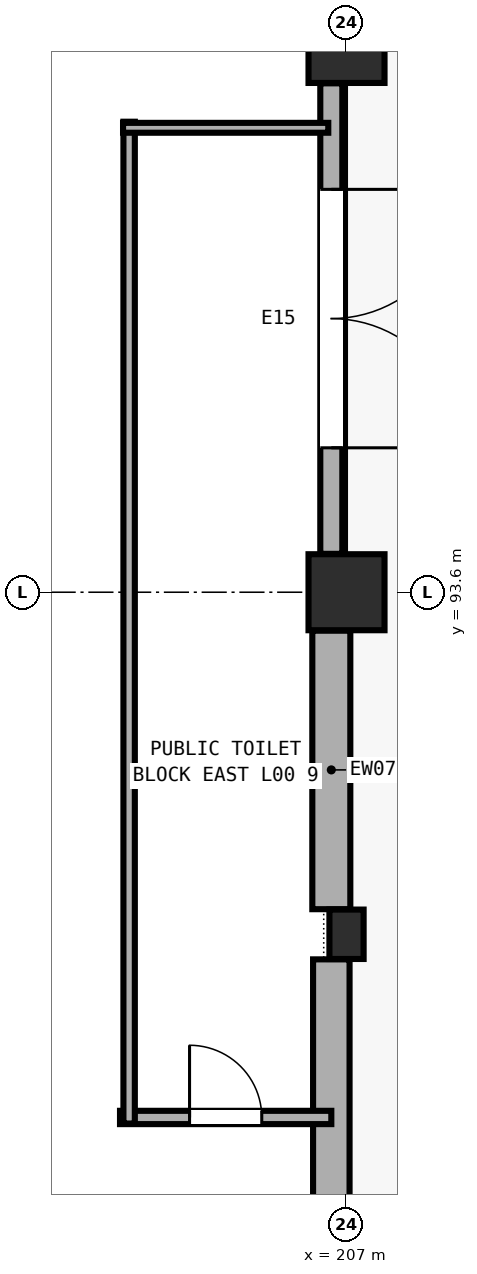
"""IFC4 building model, lengths in metres.
Left out: names, types, materials, properties, quantities, classifications, styles, units other than length and angle.
Written with IfcOpenShell. Run it as: python <this file> out.ifc"""

import sys

from ifc_helpers import new_model, si_unit, direction, frame, frame_2d, origin, origin_2d, place, context, subcontext, project, spatial, rectangle, extrude, element, fill, save


model = new_model("IFC4")
c1 = context("Model", 3, precision=1e-05, world=origin(), true_north=direction((0.0, 1.0)))
c2 = subcontext(c1, "Body", "Model", "MODEL_VIEW")
j1 = project(units=[si_unit("LENGTHUNIT", "METRE"), si_unit("PLANEANGLEUNIT", "RADIAN")], contexts=[c1])
p1 = place(None, origin())
s1 = spatial("IfcSite", under=j1, at=p1, CompositionType="ELEMENT")
p2 = place(p1, origin())
s2 = spatial("IfcBuilding", under=s1, at=p2, CompositionType="ELEMENT")
p3 = place(p2, origin())
s3 = spatial("IfcBuildingStorey", under=s2, at=p3, CompositionType="ELEMENT", Elevation=0.0)
for number, where, z_axis, x_axis in (
    (1, (207.0, 93.6, 0.0), (0.0, 0.0, 1.0), (1.0, 0.0, 0.0)),
    (2, (207.0, 100.8, 0.0), (0.0, 0.0, 1.0), (1.0, 0.0, 0.0)),
):
    element("IfcColumn", number, at=place(p3, frame(where, z_axis=z_axis, x_axis=x_axis)), inside=s3, PredefinedType="COLUMN", context=c2, shape_type="SweptSolid", body=[
        extrude(rectangle(XDim=1.0, YDim=1.0, at=origin_2d()), origin(), (0.0, 0.0, 1.0), 4.8),
    ])
p4 = place(p3, frame((207.0, 89.1, 0.0), z_axis=(0.0, 0.0, 1.0), x_axis=(1.0, 0.0, 0.0)))
e3 = element("IfcColumn", 3, at=p4, inside=s3, PredefinedType="PILASTER", context=c2, shape_type="SweptSolid", body=[
    extrude(rectangle(XDim=0.45, YDim=0.65, at=origin_2d()), origin(), (0.0, 0.0, 1.0), 4.8),
])
p5 = place(p3, frame((206.8, 100.295, 0.0), z_axis=(0.0, 0.0, 1.0), x_axis=(0.0, -1.0, 0.0)))
e4 = element("IfcWall", 4, at=p5, inside=s3, PredefinedType="SOLIDWALL", context=c2, shape_type="SweptSolid", body=[
    extrude(rectangle(XDim=6.19, YDim=0.29, at=frame_2d((3.095, 0.0))), origin(), (0.0, 0.0, 1.0), 3.58),
])
p6 = place(p5, frame((1.395, 0.0, 0.0)))
e5 = element("IfcOpeningElement", 5, at=p6, cuts=e4, PredefinedType="OPENING", context=c2, shape_type="SweptSolid", body=[
    extrude(rectangle(XDim=3.4, YDim=2.55, at=frame_2d((1.7, 1.275))), frame((0.0, 0.155, 0.0), z_axis=(0.0, -1.0, 0.0), x_axis=(1.0, 0.0, 0.0)), (0.0, 0.0, 1.0), 0.31),
])
p7 = place(p3, frame((206.8, 93.095, 0.0), z_axis=(0.0, 0.0, 1.0), x_axis=(0.0, -1.0, 0.0)))
e6 = element("IfcWall", 6, at=p7, inside=s3, PredefinedType="SOLIDWALL", context=c2, shape_type="SweptSolid", body=[
    extrude(rectangle(XDim=3.665, YDim=0.5, at=frame_2d((1.833, 0.0))), origin(), (0.0, 0.0, 1.0), 3.58),
])
p8 = place(p3, frame((206.8, 88.77, 0.0), z_axis=(0.0, 0.0, 1.0), x_axis=(0.0, -1.0, 0.0)))
e7 = element("IfcWall", 7, at=p8, inside=s3, PredefinedType="SOLIDWALL", context=c2, shape_type="SweptSolid", body=[
    extrude(rectangle(XDim=3.665, YDim=0.48, at=frame_2d((1.833, 0.0))), origin(), (0.0, 0.0, 1.0), 3.58),
])
p9 = place(p3, frame((204.02, 86.69, 0.0), z_axis=(0.0, 0.0, 1.0), x_axis=(1.0, 0.0, 0.0)))
e8 = element("IfcWall", 8, at=p9, inside=s3, PredefinedType="PARTITIONING", context=c2, shape_type="SweptSolid", body=[
    extrude(rectangle(XDim=2.78, YDim=0.175, at=frame_2d((1.39, 0.0))), origin(), (0.0, 0.0, 1.0), 3.28),
])
p10 = place(p9, frame((0.915, 0.0, 0.0)))
e9 = element("IfcOpeningElement", 9, at=p10, cuts=e8, PredefinedType="OPENING", context=c2, shape_type="SweptSolid", body=[
    extrude(rectangle(XDim=0.95, YDim=2.1, at=frame_2d((0.475, 1.05))), frame((0.0, 0.097, 0.0), z_axis=(0.0, -1.0, 0.0), x_axis=(1.0, 0.0, 0.0)), (0.0, 0.0, 1.0), 0.195),
])
p11 = place(p3, frame((204.14, 86.61, 0.0), z_axis=(0.0, 0.0, 1.0), x_axis=(0.0, 1.0, 0.0)))
e10 = element("IfcWall", 10, at=p11, inside=s3, PredefinedType="PARTITIONING", context=c2, shape_type="SweptSolid", body=[
    extrude(rectangle(XDim=13.18, YDim=0.15, at=frame_2d((6.59, 0.0))), origin(), (0.0, 0.0, 1.0), 3.28),
])
p12 = place(p3, frame((204.06, 99.71, 0.0), z_axis=(0.0, 0.0, 1.0), x_axis=(1.0, 0.0, 0.0)))
e11 = element("IfcWall", 11, at=p12, inside=s3, PredefinedType="PARTITIONING", context=c2, shape_type="SweptSolid", body=[
    extrude(rectangle(XDim=2.7, YDim=0.13, at=frame_2d((1.35, 0.0))), origin(), (0.0, 0.0, 1.0), 3.28),
])
p13 = place(p6, origin())
e12 = element("IfcDoor", 12, at=p13, inside=s3, OperationType="DOUBLE_DOOR_SINGLE_SWING", PredefinedType="DOOR", context=c2, shape_type="SweptSolid", body=[
    extrude(rectangle(XDim=3.4, YDim=2.55, at=frame_2d((1.7, 1.275))), frame((0.0, 0.025, 0.0), z_axis=(0.0, -1.0, 0.0), x_axis=(1.0, 0.0, 0.0)), (0.0, 0.0, 1.0), 0.05),
])
fill(e5, e12)
p14 = place(p10, origin())
e13 = element("IfcDoor", 13, at=p14, inside=s3, OperationType="SINGLE_SWING_LEFT", PredefinedType="DOOR", context=c2, shape_type="SweptSolid", body=[
    extrude(rectangle(XDim=0.95, YDim=2.1, at=frame_2d((0.475, 1.05))), frame((0.0, 0.025, 0.0), z_axis=(0.0, -1.0, 0.0), x_axis=(1.0, 0.0, 0.0)), (0.0, 0.0, 1.0), 0.05),
])
fill(e9, e13)
save(model, sys.argv[1])
